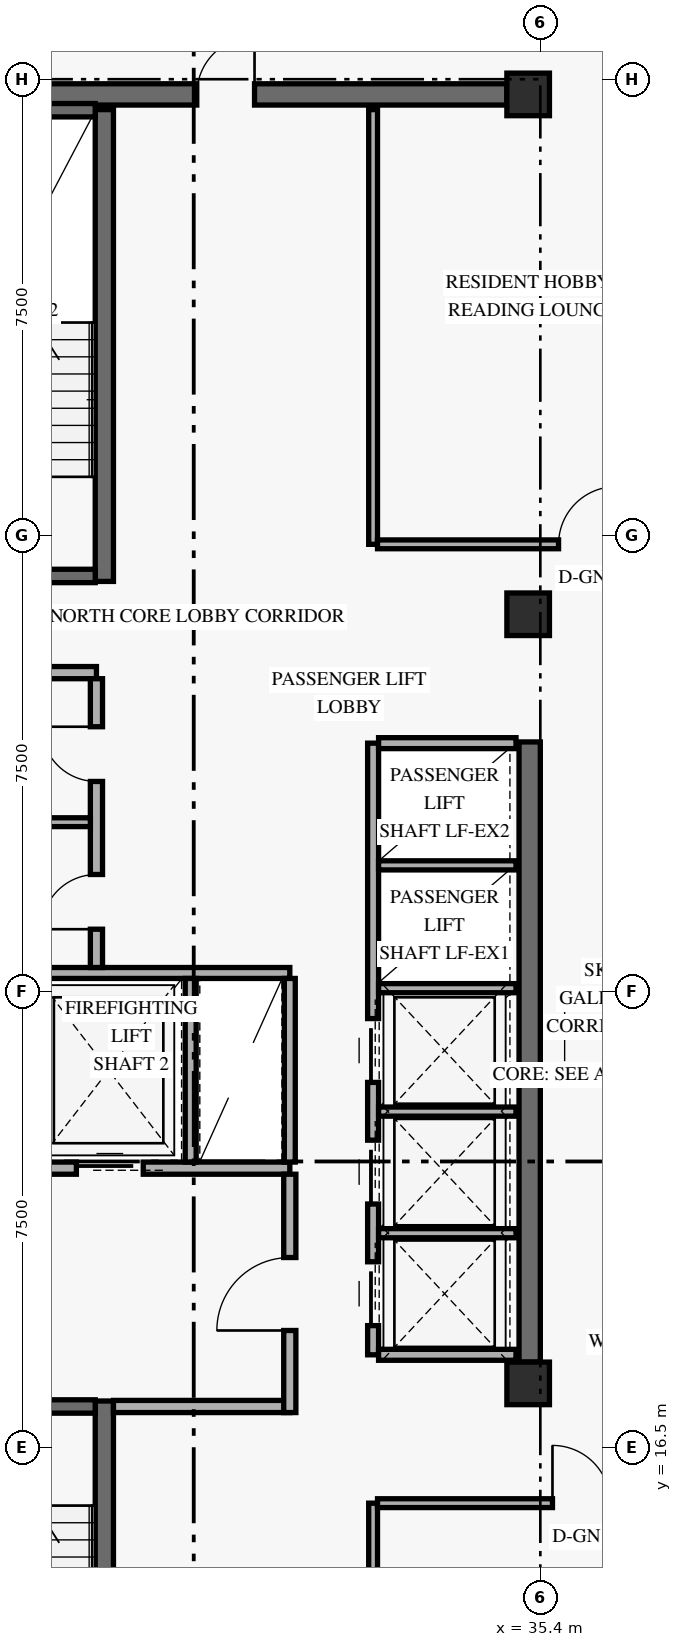
"""IFC4 building model, lengths in metres.
Left out: names, types, materials, properties, quantities, classifications, styles, units other than length and angle.
Written with IfcOpenShell. Run it as: python <this file> out.ifc"""

import sys

from ifc_helpers import new_model, si_unit, direction, frame, frame_2d, origin, origin_2d, place, context, subcontext, project, spatial, rectangle, extrude, element, fill, save


model = new_model("IFC4")
c1 = context("Model", 3, precision=1e-05, world=origin(), true_north=direction((0.0, 1.0)))
c2 = subcontext(c1, "Body", "Model", "MODEL_VIEW")
j1 = project(units=[si_unit("LENGTHUNIT", "METRE"), si_unit("PLANEANGLEUNIT", "RADIAN")], contexts=[c1])
p1 = place(None, origin())
s1 = spatial("IfcSite", under=j1, at=p1, CompositionType="ELEMENT")
p2 = place(p1, origin())
s2 = spatial("IfcBuilding", under=s1, at=p2, CompositionType="ELEMENT")
p3 = place(p2, frame((0.0, 0.0, 253.2)))
s3 = spatial("IfcBuildingStorey", under=s2, at=p3, CompositionType="ELEMENT", Elevation=253.2)
p4 = place(p3, frame((35.225, 17.9, 0.0), z_axis=(0.0, 0.0, 1.0), x_axis=(0.0, 1.0, 0.0)))
e1 = element("IfcWall", 1, at=p4, inside=s3, PredefinedType="SHEAR", context=c2, shape_type="SweptSolid", body=[
    extrude(rectangle(XDim=10.2, YDim=0.35, at=frame_2d((5.1, 0.0))), origin(), (0.0, 0.0, 1.0), 2.821),
])
p5 = place(p3, frame((24.55, 38.75, 0.0), z_axis=(0.0, 0.0, 1.0), x_axis=(1.0, 0.0, 0.0)))
e2 = element("IfcWall", 2, at=p5, inside=s3, PredefinedType="SHEAR", context=c2, shape_type="SweptSolid", body=[
    extrude(rectangle(XDim=10.3, YDim=0.35, at=frame_2d((5.15, 0.0))), origin(), (0.0, 0.0, 1.0), 3.36),
])
p6 = place(p5, frame((5.2, 0.0, 0.0)))
e3 = element("IfcOpeningElement", 3, at=p6, cuts=e2, PredefinedType="OPENING", context=c2, shape_type="SweptSolid", body=[
    extrude(rectangle(XDim=0.95, YDim=2.15, at=frame_2d((0.475, 1.075))), frame((0.0, 0.185, 0.0), z_axis=(0.0, -1.0, 0.0), x_axis=(1.0, 0.0, 0.0)), (0.0, 0.0, 1.0), 0.37),
])
p7 = place(p3, frame((28.23, 9.5, 0.0), z_axis=(0.0, 0.0, 1.0), x_axis=(0.0, 1.0, 0.0)))
e4 = element("IfcWall", 4, at=p7, inside=s3, PredefinedType="SHEAR", context=c2, shape_type="SweptSolid", body=[
    extrude(rectangle(XDim=7.76, YDim=0.3, at=frame_2d((3.88, 0.0))), origin(), (0.0, 0.0, 1.0), 3.36),
])
p8 = place(p3, frame((24.92, 17.17, 0.0), z_axis=(0.0, 0.0, 1.0), x_axis=(1.0, 0.0, 0.0)))
e5 = element("IfcWall", 5, at=p8, inside=s3, PredefinedType="SHEAR", context=c2, shape_type="SweptSolid", body=[
    extrude(rectangle(XDim=3.16, YDim=0.22, at=frame_2d((1.58, 0.0))), origin(), (0.0, 0.0, 1.0), 3.36),
])
p9 = place(p8, frame((0.78, 0.0, 0.0)))
e6 = element("IfcOpeningElement", 6, at=p9, cuts=e5, PredefinedType="OPENING", context=c2, shape_type="SweptSolid", body=[
    extrude(rectangle(XDim=1.05, YDim=2.15, at=frame_2d((0.525, 1.075))), frame((0.0, 0.12, 0.0), z_axis=(0.0, -1.0, 0.0), x_axis=(1.0, 0.0, 0.0)), (0.0, 0.0, 1.0), 0.24),
])
p10 = place(p3, frame((28.23, 30.74, 0.0), z_axis=(0.0, 0.0, 1.0), x_axis=(0.0, 1.0, 0.0)))
e7 = element("IfcWall", 7, at=p10, inside=s3, PredefinedType="SHEAR", context=c2, shape_type="SweptSolid", body=[
    extrude(rectangle(XDim=7.76, YDim=0.3, at=frame_2d((3.88, 0.0))), origin(), (0.0, 0.0, 1.0), 3.36),
])
p11 = place(p3, frame((24.92, 30.83, 0.0), z_axis=(0.0, 0.0, 1.0), x_axis=(1.0, 0.0, 0.0)))
e8 = element("IfcWall", 8, at=p11, inside=s3, PredefinedType="SHEAR", context=c2, shape_type="SweptSolid", body=[
    extrude(rectangle(XDim=3.16, YDim=0.22, at=frame_2d((1.58, 0.0))), origin(), (0.0, 0.0, 1.0), 3.36),
])
p12 = place(p11, frame((0.78, 0.0, 0.0)))
e9 = element("IfcOpeningElement", 9, at=p12, cuts=e8, PredefinedType="OPENING", context=c2, shape_type="SweptSolid", body=[
    extrude(rectangle(XDim=1.05, YDim=2.15, at=frame_2d((0.525, 1.075))), frame((0.0, 0.12, 0.0), z_axis=(0.0, -1.0, 0.0), x_axis=(1.0, 0.0, 0.0)), (0.0, 0.0, 1.0), 0.24),
])
p13 = place(p3, frame((24.92, 38.49, 0.0), z_axis=(0.0, 0.0, 1.0), x_axis=(1.0, 0.0, 0.0)))
e10 = element("IfcWall", 10, at=p13, inside=s3, PredefinedType="SHEAR", context=c2, shape_type="SweptSolid", body=[
    extrude(rectangle(XDim=3.16, YDim=0.22, at=frame_2d((1.58, 0.0))), origin(), (0.0, 0.0, 1.0), 3.36),
])
for number, where, z_axis, x_axis in (
    (11, (35.2, 17.55, 0.0), (0.0, 0.0, 1.0), (1.0, 0.0, 0.0)),
    (12, (35.2, 30.2, 0.0), (0.0, 0.0, 1.0), (1.0, 0.0, 0.0)),
    (13, (35.2, 38.75, 0.0), (0.0, 0.0, 1.0), (1.0, 0.0, 0.0)),
):
    element("IfcColumn", number, at=place(p3, frame(where, z_axis=z_axis, x_axis=x_axis)), inside=s3, PredefinedType="COLUMN", context=c2, shape_type="SweptSolid", body=[
        extrude(rectangle(XDim=0.7, YDim=0.7, at=origin_2d()), origin(), (0.0, 0.0, 1.0), 3.6),
    ])
p14 = place(p3, frame((24.45, 21.09, 0.0), z_axis=(0.0, 0.0, 1.0), x_axis=(1.0, 0.0, 0.0)))
e14 = element("IfcWall", 14, at=p14, inside=s3, PredefinedType="STANDARD", context=c2, shape_type="SweptSolid", body=[
    extrude(rectangle(XDim=6.83, YDim=0.2, at=frame_2d((3.415, 0.0))), origin(), (0.0, 0.0, 1.0), 3.36),
])
p15 = place(p14, frame((0.72, 0.0, 0.0)))
e15 = element("IfcOpeningElement", 15, at=p15, cuts=e14, PredefinedType="OPENING", context=c2, shape_type="SweptSolid", body=[
    extrude(rectangle(XDim=1.1, YDim=2.2, at=frame_2d((0.55, 1.1))), frame((0.0, 0.11, 0.0), z_axis=(0.0, -1.0, 0.0), x_axis=(1.0, 0.0, 0.0)), (0.0, 0.0, 1.0), 0.22),
])
p16 = place(p14, frame((3.32, 0.0, 0.0)))
e16 = element("IfcOpeningElement", 16, at=p16, cuts=e14, PredefinedType="OPENING", context=c2, shape_type="SweptSolid", body=[
    extrude(rectangle(XDim=1.1, YDim=2.2, at=frame_2d((0.55, 1.1))), frame((0.0, 0.11, 0.0), z_axis=(0.0, -1.0, 0.0), x_axis=(1.0, 0.0, 0.0)), (0.0, 0.0, 1.0), 0.22),
])
p17 = place(p3, frame((28.38, 17.17, 0.0), z_axis=(0.0, 0.0, 1.0), x_axis=(1.0, 0.0, 0.0)))
e17 = element("IfcWall", 17, at=p17, inside=s3, PredefinedType="STANDARD", context=c2, shape_type="SweptSolid", body=[
    extrude(rectangle(XDim=2.9, YDim=0.2, at=frame_2d((1.45, 0.0))), origin(), (0.0, 0.0, 1.0), 3.36),
])
p18 = place(p3, frame((31.28, 17.07, 0.0), z_axis=(0.0, 0.0, 1.0), x_axis=(0.0, 1.0, 0.0)))
e18 = element("IfcWall", 18, at=p18, inside=s3, PredefinedType="STANDARD", context=c2, shape_type="SweptSolid", body=[
    extrude(rectangle(XDim=3.92, YDim=0.2, at=frame_2d((1.96, 0.0))), origin(), (0.0, 0.0, 1.0), 2.803),
])
p19 = place(p18, frame((1.35, 0.0, 0.0)))
e19 = element("IfcOpeningElement", 19, at=p19, cuts=e18, PredefinedType="OPENING", context=c2, shape_type="SweptSolid", body=[
    extrude(rectangle(XDim=1.2, YDim=2.15, at=frame_2d((0.6, 1.075))), frame((0.0, 0.11, 0.0), z_axis=(0.0, -1.0, 0.0), x_axis=(1.0, 0.0, 0.0)), (0.0, 0.0, 1.0), 0.22),
])
p20 = place(p3, frame((24.45, 24.3, 0.0), z_axis=(0.0, 0.0, 1.0), x_axis=(1.0, 0.0, 0.0)))
e20 = element("IfcWall", 20, at=p20, inside=s3, PredefinedType="STANDARD", context=c2, shape_type="SweptSolid", body=[
    extrude(rectangle(XDim=6.83, YDim=0.18, at=frame_2d((3.415, 0.0))), origin(), (0.0, 0.0, 1.0), 3.36),
])
for number, where, z_axis, x_axis in (
    (21, (29.65, 21.19, 0.0), (0.0, 0.0, 1.0), (0.0, 1.0, 0.0)),
    (22, (31.28, 21.19, 0.0), (0.0, 0.0, 1.0), (0.0, 1.0, 0.0)),
):
    element("IfcWall", number, at=place(p3, frame(where, z_axis=z_axis, x_axis=x_axis)), inside=s3, PredefinedType="STANDARD", context=c2, shape_type="SweptSolid", body=[
        extrude(rectangle(XDim=3.02, YDim=0.18, at=frame_2d((1.51, 0.0))), origin(), (0.0, 0.0, 1.0), 3.36),
    ])
p21 = place(p3, frame((24.45, 29.24, 0.0), z_axis=(0.0, 0.0, 1.0), x_axis=(1.0, 0.0, 0.0)))
e23 = element("IfcWall", 23, at=p21, inside=s3, PredefinedType="STANDARD", context=c2, shape_type="SweptSolid", body=[
    extrude(rectangle(XDim=3.65, YDim=0.2, at=frame_2d((1.825, 0.0))), origin(), (0.0, 0.0, 1.0), 3.36),
])
p22 = place(p3, frame((28.1, 24.39, 0.0), z_axis=(0.0, 0.0, 1.0), x_axis=(0.0, 1.0, 0.0)))
e24 = element("IfcWall", 24, at=p22, inside=s3, PredefinedType="STANDARD", context=c2, shape_type="SweptSolid", body=[
    extrude(rectangle(XDim=4.75, YDim=0.2, at=frame_2d((2.375, 0.0))), origin(), (0.0, 0.0, 1.0), 3.36),
])
p23 = place(p22, frame((0.63, 0.0, 0.0)))
e25 = element("IfcOpeningElement", 25, at=p23, cuts=e24, PredefinedType="OPENING", context=c2, shape_type="SweptSolid", body=[
    extrude(rectangle(XDim=0.9, YDim=2.1, at=frame_2d((0.45, 1.05))), frame((0.0, 0.11, 0.0), z_axis=(0.0, -1.0, 0.0), x_axis=(1.0, 0.0, 0.0)), (0.0, 0.0, 1.0), 0.22),
])
p24 = place(p22, frame((3.06, 0.0, 0.0)))
e26 = element("IfcOpeningElement", 26, at=p24, cuts=e24, PredefinedType="OPENING", context=c2, shape_type="SweptSolid", body=[
    extrude(rectangle(XDim=0.9, YDim=2.1, at=frame_2d((0.45, 1.05))), frame((0.0, 0.11, 0.0), z_axis=(0.0, -1.0, 0.0), x_axis=(1.0, 0.0, 0.0)), (0.0, 0.0, 1.0), 0.22),
])
p25 = place(p3, frame((24.45, 26.78, 0.0), z_axis=(0.0, 0.0, 1.0), x_axis=(1.0, 0.0, 0.0)))
e27 = element("IfcWall", 27, at=p25, inside=s3, PredefinedType="PARTITIONING", context=c2, shape_type="SweptSolid", body=[
    extrude(rectangle(XDim=3.55, YDim=0.145, at=frame_2d((1.775, 0.0))), origin(), (0.0, 0.0, 1.0), 3.36),
])
p26 = place(p3, frame((32.65, 18.02, 0.0), z_axis=(0.0, 0.0, 1.0), x_axis=(0.0, 1.0, 0.0)))
e28 = element("IfcWall", 28, at=p26, inside=s3, PredefinedType="STANDARD", context=c2, shape_type="SweptSolid", body=[
    extrude(rectangle(XDim=10.06, YDim=0.18, at=frame_2d((5.03, 0.0))), origin(), (0.0, 0.0, 1.0), 3.36),
])
p27 = place(p26, frame((0.48, 0.0, 0.0)))
e29 = element("IfcOpeningElement", 29, at=p27, cuts=e28, PredefinedType="OPENING", context=c2, shape_type="SweptSolid", body=[
    extrude(rectangle(XDim=1.05, YDim=2.2, at=frame_2d((0.525, 1.1))), frame((0.0, 0.1, 0.0), z_axis=(0.0, -1.0, 0.0), x_axis=(1.0, 0.0, 0.0)), (0.0, 0.0, 1.0), 0.2),
])
p28 = place(p26, frame((2.48, 0.0, 0.0)))
e30 = element("IfcOpeningElement", 30, at=p28, cuts=e28, PredefinedType="OPENING", context=c2, shape_type="SweptSolid", body=[
    extrude(rectangle(XDim=1.05, YDim=2.2, at=frame_2d((0.525, 1.1))), frame((0.0, 0.1, 0.0), z_axis=(0.0, -1.0, 0.0), x_axis=(1.0, 0.0, 0.0)), (0.0, 0.0, 1.0), 0.2),
])
p29 = place(p26, frame((4.48, 0.0, 0.0)))
e31 = element("IfcOpeningElement", 31, at=p29, cuts=e28, PredefinedType="OPENING", context=c2, shape_type="SweptSolid", body=[
    extrude(rectangle(XDim=1.05, YDim=2.2, at=frame_2d((0.525, 1.1))), frame((0.0, 0.1, 0.0), z_axis=(0.0, -1.0, 0.0), x_axis=(1.0, 0.0, 0.0)), (0.0, 0.0, 1.0), 0.2),
])
for number, where, z_axis, x_axis in (
    (32, (32.74, 18.02, 0.0), (0.0, 0.0, 1.0), (1.0, 0.0, 0.0)),
    (33, (32.74, 28.08, 0.0), (0.0, 0.0, 1.0), (1.0, 0.0, 0.0)),
):
    element("IfcWall", number, at=place(p3, frame(where, z_axis=z_axis, x_axis=x_axis)), inside=s3, PredefinedType="STANDARD", context=c2, shape_type="SweptSolid", body=[
        extrude(rectangle(XDim=2.26, YDim=0.18, at=frame_2d((1.13, 0.0))), origin(), (0.0, 0.0, 1.0), 3.36),
    ])
for number, where, z_axis, x_axis in (
    (34, (32.74, 20.02, 0.0), (0.0, 0.0, 1.0), (1.0, 0.0, 0.0)),
    (35, (32.74, 22.02, 0.0), (0.0, 0.0, 1.0), (1.0, 0.0, 0.0)),
    (36, (32.74, 24.05, 0.0), (0.0, 0.0, 1.0), (1.0, 0.0, 0.0)),
    (37, (32.74, 26.07, 0.0), (0.0, 0.0, 1.0), (1.0, 0.0, 0.0)),
):
    element("IfcWall", number, at=place(p3, frame(where, z_axis=z_axis, x_axis=x_axis)), inside=s3, PredefinedType="STANDARD", context=c2, shape_type="SweptSolid", body=[
        extrude(rectangle(XDim=2.26, YDim=0.15, at=frame_2d((1.13, 0.0))), origin(), (0.0, 0.0, 1.0), 3.36),
    ])
p30 = place(p3, frame((32.65, 9.5, 0.0), z_axis=(0.0, 0.0, 1.0), x_axis=(0.0, 1.0, 0.0)))
e38 = element("IfcWall", 38, at=p30, inside=s3, PredefinedType="PARTITIONING", context=c2, shape_type="SweptSolid", body=[
    extrude(rectangle(XDim=6.08, YDim=0.145, at=frame_2d((3.04, 0.0))), origin(), (0.0, 0.0, 1.0), 3.36),
])
p31 = place(p3, frame((32.722, 15.58, 0.0), z_axis=(0.0, 0.0, 1.0), x_axis=(1.0, 0.0, 0.0)))
e39 = element("IfcWall", 39, at=p31, inside=s3, PredefinedType="PARTITIONING", context=c2, shape_type="SweptSolid", body=[
    extrude(rectangle(XDim=5.228, YDim=0.145, at=frame_2d((2.614, 0.0))), origin(), (0.0, 0.0, 1.0), 2.803),
])
p32 = place(p31, frame((2.877, 0.0, 0.0)))
e40 = element("IfcOpeningElement", 40, at=p32, cuts=e39, PredefinedType="OPENING", context=c2, shape_type="SweptSolid", body=[
    extrude(rectangle(XDim=0.95, YDim=2.15, at=frame_2d((0.475, 1.075))), frame((0.0, 0.083, 0.0), z_axis=(0.0, -1.0, 0.0), x_axis=(1.0, 0.0, 0.0)), (0.0, 0.0, 1.0), 0.165),
])
p33 = place(p3, frame((32.65, 31.35, 0.0), z_axis=(0.0, 0.0, 1.0), x_axis=(0.0, 1.0, 0.0)))
e41 = element("IfcWall", 41, at=p33, inside=s3, PredefinedType="PARTITIONING", context=c2, shape_type="SweptSolid", body=[
    extrude(rectangle(XDim=7.15, YDim=0.145, at=frame_2d((3.575, 0.0))), origin(), (0.0, 0.0, 1.0), 3.36),
])
p34 = place(p3, frame((32.722, 31.35, 0.0), z_axis=(0.0, 0.0, 1.0), x_axis=(1.0, 0.0, 0.0)))
e42 = element("IfcWall", 42, at=p34, inside=s3, PredefinedType="PARTITIONING", context=c2, shape_type="SweptSolid", body=[
    extrude(rectangle(XDim=5.778, YDim=0.145, at=frame_2d((2.889, 0.0))), origin(), (0.0, 0.0, 1.0), 2.803),
])
p35 = place(p34, frame((2.978, 0.0, 0.0)))
e43 = element("IfcOpeningElement", 43, at=p35, cuts=e42, PredefinedType="OPENING", context=c2, shape_type="SweptSolid", body=[
    extrude(rectangle(XDim=0.95, YDim=2.15, at=frame_2d((0.475, 1.075))), frame((0.0, 0.083, 0.0), z_axis=(0.0, -1.0, 0.0), x_axis=(1.0, 0.0, 0.0)), (0.0, 0.0, 1.0), 0.165),
])
p36 = place(p16, origin())
e44 = element("IfcDoor", 44, at=p36, inside=s3, OperationType="SLIDING_TO_LEFT", PredefinedType="DOOR", context=c2, shape_type="SweptSolid", body=[
    extrude(rectangle(XDim=1.1, YDim=2.2, at=frame_2d((0.55, 1.1))), frame((0.0, 0.025, 0.0), z_axis=(0.0, -1.0, 0.0), x_axis=(1.0, 0.0, 0.0)), (0.0, 0.0, 1.0), 0.05),
])
fill(e16, e44)
p37 = place(p19, origin())
e45 = element("IfcDoor", 45, at=p37, inside=s3, OperationType="SINGLE_SWING_LEFT", PredefinedType="DOOR", context=c2, shape_type="SweptSolid", body=[
    extrude(rectangle(XDim=1.2, YDim=2.15, at=frame_2d((0.6, 1.075))), frame((0.0, 0.025, 0.0), z_axis=(0.0, -1.0, 0.0), x_axis=(1.0, 0.0, 0.0)), (0.0, 0.0, 1.0), 0.05),
])
fill(e19, e45)
p38 = place(p23, origin())
e46 = element("IfcDoor", 46, at=p38, inside=s3, OperationType="SINGLE_SWING_LEFT", PredefinedType="DOOR", context=c2, shape_type="SweptSolid", body=[
    extrude(rectangle(XDim=0.9, YDim=2.1, at=frame_2d((0.45, 1.05))), frame((0.0, 0.025, 0.0), z_axis=(0.0, -1.0, 0.0), x_axis=(1.0, 0.0, 0.0)), (0.0, 0.0, 1.0), 0.05),
])
fill(e25, e46)
p39 = place(p24, origin())
e47 = element("IfcDoor", 47, at=p39, inside=s3, OperationType="SINGLE_SWING_RIGHT", PredefinedType="DOOR", context=c2, shape_type="SweptSolid", body=[
    extrude(rectangle(XDim=0.9, YDim=2.1, at=frame_2d((0.45, 1.05))), frame((0.0, 0.025, 0.0), z_axis=(0.0, -1.0, 0.0), x_axis=(1.0, 0.0, 0.0)), (0.0, 0.0, 1.0), 0.05),
])
fill(e26, e47)
p40 = place(p27, origin())
e48 = element("IfcDoor", 48, at=p40, inside=s3, OperationType="SLIDING_TO_LEFT", PredefinedType="DOOR", context=c2, shape_type="SweptSolid", body=[
    extrude(rectangle(XDim=1.05, YDim=2.2, at=frame_2d((0.525, 1.1))), frame((0.0, 0.025, 0.0), z_axis=(0.0, -1.0, 0.0), x_axis=(1.0, 0.0, 0.0)), (0.0, 0.0, 1.0), 0.05),
])
fill(e29, e48)
p41 = place(p28, origin())
e49 = element("IfcDoor", 49, at=p41, inside=s3, OperationType="SLIDING_TO_LEFT", PredefinedType="DOOR", context=c2, shape_type="SweptSolid", body=[
    extrude(rectangle(XDim=1.05, YDim=2.2, at=frame_2d((0.525, 1.1))), frame((0.0, 0.025, 0.0), z_axis=(0.0, -1.0, 0.0), x_axis=(1.0, 0.0, 0.0)), (0.0, 0.0, 1.0), 0.05),
])
fill(e30, e49)
p42 = place(p29, origin())
e50 = element("IfcDoor", 50, at=p42, inside=s3, OperationType="SLIDING_TO_LEFT", PredefinedType="DOOR", context=c2, shape_type="SweptSolid", body=[
    extrude(rectangle(XDim=1.05, YDim=2.2, at=frame_2d((0.525, 1.1))), frame((0.0, 0.025, 0.0), z_axis=(0.0, -1.0, 0.0), x_axis=(1.0, 0.0, 0.0)), (0.0, 0.0, 1.0), 0.05),
])
fill(e31, e50)
p43 = place(p32, origin())
e51 = element("IfcDoor", 51, at=p43, inside=s3, OperationType="SINGLE_SWING_LEFT", PredefinedType="DOOR", context=c2, shape_type="SweptSolid", body=[
    extrude(rectangle(XDim=0.95, YDim=2.15, at=frame_2d((0.475, 1.075))), frame((0.0, 0.025, 0.0), z_axis=(0.0, -1.0, 0.0), x_axis=(1.0, 0.0, 0.0)), (0.0, 0.0, 1.0), 0.05),
])
fill(e40, e51)
p44 = place(p35, origin())
e52 = element("IfcDoor", 52, at=p44, inside=s3, OperationType="SINGLE_SWING_RIGHT", PredefinedType="DOOR", context=c2, shape_type="SweptSolid", body=[
    extrude(rectangle(XDim=0.95, YDim=2.15, at=frame_2d((0.475, 1.075))), frame((0.0, 0.025, 0.0), z_axis=(0.0, -1.0, 0.0), x_axis=(1.0, 0.0, 0.0)), (0.0, 0.0, 1.0), 0.05),
])
fill(e43, e52)
p45 = place(p6, origin())
e53 = element("IfcDoor", 53, at=p45, inside=s3, OperationType="SINGLE_SWING_RIGHT", PredefinedType="DOOR", context=c2, shape_type="SweptSolid", body=[
    extrude(rectangle(XDim=0.95, YDim=2.15, at=frame_2d((0.475, 1.075))), frame((0.0, 0.025, 0.0), z_axis=(0.0, -1.0, 0.0), x_axis=(1.0, 0.0, 0.0)), (0.0, 0.0, 1.0), 0.05),
])
fill(e3, e53)
save(model, sys.argv[1])
